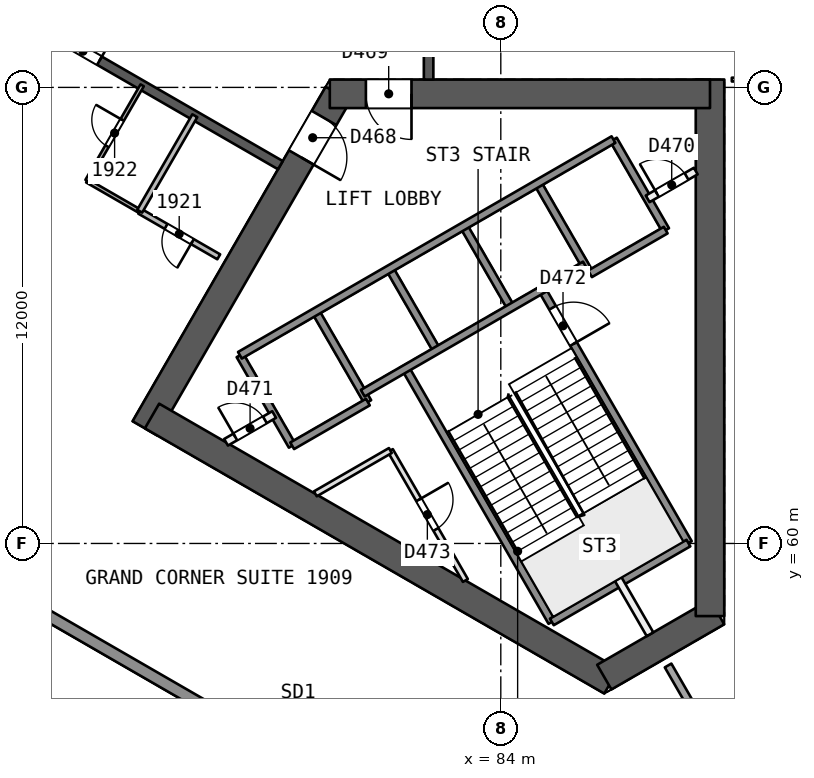
"""IFC4 building model, lengths in metres.
Left out: names, types, materials, properties, quantities, classifications, styles, units other than length and angle.
Written with IfcOpenShell. Run it as: python <this file> out.ifc"""

import sys

from ifc_helpers import new_model, si_unit, direction, frame, frame_2d, origin, place, context, subcontext, project, spatial, rectangle, extrude, element, fill, save


model = new_model("IFC4")
c1 = context("Model", 3, precision=1e-05, world=origin(), true_north=direction((0.0, 1.0)))
c2 = subcontext(c1, "Body", "Model", "MODEL_VIEW")
j1 = project(units=[si_unit("LENGTHUNIT", "METRE"), si_unit("PLANEANGLEUNIT", "RADIAN")], contexts=[c1])
p1 = place(None, origin())
s1 = spatial("IfcSite", under=j1, at=p1, CompositionType="ELEMENT")
p2 = place(p1, origin())
s2 = spatial("IfcBuilding", under=s1, at=p2, CompositionType="ELEMENT")
p3 = place(p2, frame((0.0, 0.0, 83.2)))
s3 = spatial("IfcBuildingStorey", under=s2, at=p3, CompositionType="ELEMENT", Elevation=83.2)
p4 = place(p3, frame((79.717, 71.831, 0.0), z_axis=(0.0, 0.0, 1.0), x_axis=(-0.499996230114, -0.866027580318, 0.0)))
e1 = element("IfcWall", 1, at=p4, inside=s3, PredefinedType="SHEAR", context=c2, shape_type="SweptSolid", body=[
    extrude(rectangle(XDim=10.164, YDim=0.75, at=frame_2d((5.082, 0.0))), origin(), (0.0, 0.0, 1.0), 3.7),
])
p5 = place(p4, frame((0.733, 0.0, 0.0)))
e2 = element("IfcOpeningElement", 2, at=p5, cuts=e1, PredefinedType="OPENING", context=c2, shape_type="SweptSolid", body=[
    extrude(rectangle(XDim=1.2, YDim=2.1, at=frame_2d((0.6, 1.05))), frame((0.0, 0.385, 0.0), z_axis=(0.0, -1.0, 0.0), x_axis=(1.0, 0.0, 0.0)), (0.0, 0.0, 1.0), 0.771),
])
p6 = place(p3, frame((74.822, 63.354, 0.0), z_axis=(0.0, 0.0, 1.0), x_axis=(0.8660248072, -0.500001033313, 0.0)))
e3 = element("IfcWall", 3, at=p6, inside=s3, PredefinedType="SHEAR", context=c2, shape_type="SweptSolid", body=[
    extrude(rectangle(XDim=13.958, YDim=0.75, at=frame_2d((6.979, 0.0))), origin(), (0.0, 0.0, 1.0), 3.7),
])
p7 = place(p3, frame((86.723, 56.483, 0.0), z_axis=(0.0, 0.0, 1.0), x_axis=(0.866017201164, 0.500014207086, 0.0)))
e4 = element("IfcWall", 4, at=p7, inside=s3, PredefinedType="SHEAR", context=c2, shape_type="SweptSolid", body=[
    extrude(rectangle(XDim=3.429, YDim=0.75, at=frame_2d((1.714, 0.0))), origin(), (0.0, 0.0, 1.0), 3.7),
])
p8 = place(p3, frame((89.505, 58.089, 0.0), z_axis=(0.0, 0.0, 1.0), x_axis=(0.0, 1.0, 0.0)))
e5 = element("IfcWall", 5, at=p8, inside=s3, PredefinedType="SHEAR", context=c2, shape_type="SweptSolid", body=[
    extrude(rectangle(XDim=14.117, YDim=0.75, at=frame_2d((7.059, 0.0))), origin(), (0.0, 0.0, 1.0), 3.7),
])
p9 = place(p3, frame((89.505, 71.831, 0.0), z_axis=(0.0, 0.0, 1.0), x_axis=(-1.0, 0.0, 0.0)))
e6 = element("IfcWall", 6, at=p9, inside=s3, PredefinedType="SHEAR", context=c2, shape_type="SweptSolid", body=[
    extrude(rectangle(XDim=10.005, YDim=0.75, at=frame_2d((5.002, 0.0))), origin(), (0.0, 0.0, 1.0), 3.7),
])
p10 = place(p9, frame((7.855, 0.0, 0.0)))
e7 = element("IfcOpeningElement", 7, at=p10, cuts=e6, PredefinedType="OPENING", context=c2, shape_type="SweptSolid", body=[
    extrude(rectangle(XDim=1.2, YDim=2.1, at=frame_2d((0.6, 1.05))), frame((0.0, 0.385, 0.0), z_axis=(0.0, -1.0, 0.0), x_axis=(1.0, 0.0, 0.0)), (0.0, 0.0, 1.0), 0.771),
])
p11 = place(p3, frame((82.1, 72.206, 0.0), z_axis=(0.0, 0.0, 1.0), x_axis=(0.0, 1.0, 0.0)))
e8 = element("IfcWall", 8, at=p11, inside=s3, PredefinedType="SHEAR", context=c2, shape_type="SweptSolid", body=[
    extrude(rectangle(XDim=15.588, YDim=0.25, at=frame_2d((7.794, 0.0))), origin(), (0.0, 0.0, 1.0), 3.2),
])
p12 = place(p11, frame((1.448, 0.0, 0.0)))
e9 = element("IfcOpeningElement", 9, at=p12, cuts=e8, PredefinedType="OPENING", context=c2, shape_type="SweptSolid", body=[
    extrude(rectangle(XDim=1.0, YDim=2.1, at=frame_2d((0.5, 1.05))), frame((0.0, 0.135, 0.0), z_axis=(0.0, -1.0, 0.0), x_axis=(1.0, 0.0, 0.0)), (0.0, 0.0, 1.0), 0.271),
])
p13 = place(p11, frame((6.544, 0.0, 0.0)))
e10 = element("IfcOpeningElement", 10, at=p13, cuts=e8, PredefinedType="OPENING", context=c2, shape_type="SweptSolid", body=[
    extrude(rectangle(XDim=1.0, YDim=2.1, at=frame_2d((0.5, 1.05))), frame((0.0, 0.135, 0.0), z_axis=(0.0, -1.0, 0.0), x_axis=(1.0, 0.0, 0.0)), (0.0, 0.0, 1.0), 0.271),
])
p14 = place(p11, frame((10.441, 0.0, 0.0)))
e11 = element("IfcOpeningElement", 11, at=p14, cuts=e8, PredefinedType="OPENING", context=c2, shape_type="SweptSolid", body=[
    extrude(rectangle(XDim=1.0, YDim=2.1, at=frame_2d((0.5, 1.05))), frame((0.0, 0.135, 0.0), z_axis=(0.0, -1.0, 0.0), x_axis=(1.0, 0.0, 0.0)), (0.0, 0.0, 1.0), 0.271),
])
p15 = place(p11, frame((11.841, 0.0, 0.0)))
e12 = element("IfcOpeningElement", 12, at=p15, cuts=e8, PredefinedType="OPENING", context=c2, shape_type="SweptSolid", body=[
    extrude(rectangle(XDim=1.0, YDim=2.1, at=frame_2d((0.5, 1.05))), frame((0.0, 0.135, 0.0), z_axis=(0.0, -1.0, 0.0), x_axis=(1.0, 0.0, 0.0)), (0.0, 0.0, 1.0), 0.271),
])
p16 = place(p3, frame((64.7, 77.748, 0.0), z_axis=(0.0, 0.0, 1.0), x_axis=(0.866026492143, -0.499998114903, 0.0)))
e13 = element("IfcWall", 13, at=p16, inside=s3, PredefinedType="SHEAR", context=c2, shape_type="SweptSolid", body=[
    extrude(rectangle(XDim=15.588, YDim=0.25, at=frame_2d((7.794, 0.0))), origin(), (0.0, 0.0, 1.0), 3.2),
])
p17 = place(p16, frame((3.397, 0.0, 0.0)))
e14 = element("IfcOpeningElement", 14, at=p17, cuts=e13, PredefinedType="OPENING", context=c2, shape_type="SweptSolid", body=[
    extrude(rectangle(XDim=1.0, YDim=2.1, at=frame_2d((0.5, 1.05))), frame((0.0, 0.135, 0.0), z_axis=(0.0, -1.0, 0.0), x_axis=(1.0, 0.0, 0.0)), (0.0, 0.0, 1.0), 0.271),
])
p18 = place(p16, frame((9.091, 0.0, 0.0)))
e15 = element("IfcOpeningElement", 15, at=p18, cuts=e13, PredefinedType="OPENING", context=c2, shape_type="SweptSolid", body=[
    extrude(rectangle(XDim=1.0, YDim=2.1, at=frame_2d((0.5, 1.05))), frame((0.0, 0.135, 0.0), z_axis=(0.0, -1.0, 0.0), x_axis=(1.0, 0.0, 0.0)), (0.0, 0.0, 1.0), 0.271),
])
p19 = place(p3, frame((90.079, 72.206, 0.0), z_axis=(0.0, 0.0, 1.0), x_axis=(1.0, 0.0, 0.0)))
e16 = element("IfcWall", 16, at=p19, inside=s3, PredefinedType="PARTITIONING", context=c2, shape_type="SweptSolid", body=[
    extrude(rectangle(XDim=5.198, YDim=0.1, at=frame_2d((2.599, 0.0))), origin(), (0.0, 0.0, 1.0), 3.2),
])
p20 = place(p19, frame((2.149, 0.0, 0.0)))
e17 = element("IfcOpeningElement", 17, at=p20, cuts=e16, PredefinedType="OPENING", context=c2, shape_type="SweptSolid", body=[
    extrude(rectangle(XDim=0.9, YDim=2.1, at=frame_2d((0.45, 1.05))), frame((0.0, 0.061, 0.0), z_axis=(0.0, -1.0, 0.0), x_axis=(1.0, 0.0, 0.0)), (0.0, 0.0, 1.0), 0.121),
])
p21 = place(p3, frame((88.402, 56.789, 0.0), z_axis=(0.0, 0.0, 1.0), x_axis=(0.500001128573, -0.866024752202, 0.0)))
e18 = element("IfcWall", 18, at=p21, inside=s3, PredefinedType="PARTITIONING", context=c2, shape_type="SweptSolid", body=[
    extrude(rectangle(XDim=8.696, YDim=0.2, at=frame_2d((4.348, 0.0))), origin(), (0.0, 0.0, 1.0), 3.2),
])
p22 = place(p3, frame((76.578, 67.542, 0.0), z_axis=(0.0, 0.0, 1.0), x_axis=(-0.866038271014, 0.499977712642, 0.0)))
e19 = element("IfcWall", 19, at=p22, inside=s3, PredefinedType="PARTITIONING", context=c2, shape_type="SweptSolid", body=[
    extrude(rectangle(XDim=2.401, YDim=0.15, at=frame_2d((1.2, 0.0))), origin(), (0.0, 0.0, 1.0), 3.2),
])
p23 = place(p22, frame((0.801, 0.0, 0.0)))
e20 = element("IfcOpeningElement", 20, at=p23, cuts=e19, PredefinedType="OPENING", context=c2, shape_type="SweptSolid", body=[
    extrude(rectangle(XDim=0.8, YDim=2.1, at=frame_2d((0.4, 1.05))), frame((0.0, 0.085, 0.0), z_axis=(0.0, -1.0, 0.0), x_axis=(1.0, 0.0, 0.0)), (0.0, 0.0, 1.0), 0.171),
])
p24 = place(p3, frame((74.498, 68.743, 0.0), z_axis=(0.0, 0.0, 1.0), x_axis=(-0.865989903783, 0.500061482766, 0.0)))
e21 = element("IfcWall", 21, at=p24, inside=s3, PredefinedType="PARTITIONING", context=c2, shape_type="SweptSolid", body=[
    extrude(rectangle(XDim=1.6, YDim=0.1, at=frame_2d((0.8, 0.0))), origin(), (0.0, 0.0, 1.0), 3.2),
])
p25 = place(p3, frame((73.113, 69.543, 0.0), z_axis=(0.0, 0.0, 1.0), x_axis=(0.499987231761, 0.866032775405, 0.0)))
e22 = element("IfcWall", 22, at=p25, inside=s3, PredefinedType="PARTITIONING", context=c2, shape_type="SweptSolid", body=[
    extrude(rectangle(XDim=2.9, YDim=0.1, at=frame_2d((1.45, 0.0))), origin(), (0.0, 0.0, 1.0), 3.2),
])
p26 = place(p25, frame((1.05, 0.0, 0.0)))
e23 = element("IfcOpeningElement", 23, at=p26, cuts=e22, PredefinedType="OPENING", context=c2, shape_type="SweptSolid", body=[
    extrude(rectangle(XDim=0.8, YDim=2.1, at=frame_2d((0.4, 1.05))), frame((0.0, 0.061, 0.0), z_axis=(0.0, -1.0, 0.0), x_axis=(1.0, 0.0, 0.0)), (0.0, 0.0, 1.0), 0.121),
])
p27 = place(p3, frame((75.948, 71.254, 0.0), z_axis=(0.0, 0.0, 1.0), x_axis=(-0.499987231761, -0.866032775405, 0.0)))
e24 = element("IfcWall", 24, at=p27, inside=s3, PredefinedType="PARTITIONING", context=c2, shape_type="SweptSolid", body=[
    extrude(rectangle(XDim=2.9, YDim=0.15, at=frame_2d((1.45, 0.0))), origin(), (0.0, 0.0, 1.0), 3.2),
])
p28 = place(p3, frame((90.221, 47.626, 0.0), z_axis=(0.0, 0.0, 1.0), x_axis=(-0.866025832118, 0.499999258104, 0.0)))
e25 = element("IfcWall", 25, at=p28, inside=s3, PredefinedType="SOLIDWALL", context=c2, shape_type="SweptSolid", body=[
    extrude(rectangle(XDim=58.737, YDim=0.3, at=frame_2d((29.368, 0.0))), origin(), (0.0, 0.0, 1.0), 3.2),
])
p29 = place(p28, frame((32.065, 0.0, 0.0)))
e26 = element("IfcOpeningElement", 26, at=p29, cuts=e25, PredefinedType="OPENING", context=c2, shape_type="SweptSolid", body=[
    extrude(rectangle(XDim=2.4, YDim=2.4, at=frame_2d((1.2, 1.2))), frame((0.0, 0.161, 0.0), z_axis=(0.0, -1.0, 0.0), x_axis=(1.0, 0.0, 0.0)), (0.0, 0.0, 1.0), 0.321),
])
p30 = place(p28, frame((45.575, 0.0, 0.0)))
e27 = element("IfcOpeningElement", 27, at=p30, cuts=e25, PredefinedType="OPENING", context=c2, shape_type="SweptSolid", body=[
    extrude(rectangle(XDim=2.4, YDim=2.4, at=frame_2d((1.2, 1.2))), frame((0.0, 0.161, 0.0), z_axis=(0.0, -1.0, 0.0), x_axis=(1.0, 0.0, 0.0)), (0.0, 0.0, 1.0), 0.321),
])
p31 = place(p28, frame((13.441, 0.0, 0.0)))
e28 = element("IfcOpeningElement", 28, at=p31, cuts=e25, PredefinedType="OPENING", context=c2, shape_type="SweptSolid", body=[
    extrude(rectangle(XDim=2.4, YDim=2.4, at=frame_2d((1.2, 1.2))), frame((0.0, 0.161, 0.0), z_axis=(0.0, -1.0, 0.0), x_axis=(1.0, 0.0, 0.0)), (0.0, 0.0, 1.0), 0.321),
])
p32 = place(p3, frame((77.135, 64.952, 0.0), z_axis=(0.0, 0.0, 1.0), x_axis=(0.499996545922, -0.866027397988, 0.0)))
e29 = element("IfcWall", 29, at=p32, inside=s3, PredefinedType="SOLIDWALL", context=c2, shape_type="SweptSolid", body=[
    extrude(rectangle(XDim=2.75, YDim=0.2, at=frame_2d((1.375, 0.0))), origin(), (0.0, 0.0, 1.0), 3.2),
])
p33 = place(p3, frame((81.094, 62.445, 0.0), z_axis=(0.0, 0.0, 1.0), x_axis=(0.499990112884, -0.866031112038, 0.0)))
e30 = element("IfcWall", 30, at=p33, inside=s3, PredefinedType="PARTITIONING", context=c2, shape_type="SweptSolid", body=[
    extrude(rectangle(XDim=3.948, YDim=0.15, at=frame_2d((1.974, 0.0))), origin(), (0.0, 0.0, 1.0), 3.2),
])
p34 = place(p33, frame((1.496, 0.0, 0.0)))
e31 = element("IfcOpeningElement", 31, at=p34, cuts=e30, PredefinedType="OPENING", context=c2, shape_type="SweptSolid", body=[
    extrude(rectangle(XDim=0.9, YDim=2.1, at=frame_2d((0.45, 1.05))), frame((0.0, 0.085, 0.0), z_axis=(0.0, -1.0, 0.0), x_axis=(1.0, 0.0, 0.0)), (0.0, 0.0, 1.0), 0.171),
])
p35 = place(p3, frame((79.127, 66.102, 0.0), z_axis=(0.0, 0.0, 1.0), x_axis=(0.499996545922, -0.866027397988, 0.0)))
e32 = element("IfcWall", 32, at=p35, inside=s3, PredefinedType="SOLIDWALL", context=c2, shape_type="SweptSolid", body=[
    extrude(rectangle(XDim=2.75, YDim=0.2, at=frame_2d((1.375, 0.0))), origin(), (0.0, 0.0, 1.0), 3.2),
])
p36 = place(p3, frame((81.493, 64.604, 0.0), z_axis=(0.0, 0.0, 1.0), x_axis=(0.500006057782, -0.866021906294, 0.0)))
e33 = element("IfcWall", 33, at=p36, inside=s3, PredefinedType="SOLIDWALL", context=c2, shape_type="SweptSolid", body=[
    extrude(rectangle(XDim=7.7, YDim=0.2, at=frame_2d((3.85, 0.0))), origin(), (0.0, 0.0, 1.0), 3.2),
])
p37 = place(p3, frame((81.076, 67.227, 0.0), z_axis=(0.0, 0.0, 1.0), x_axis=(0.50000366821, -0.866023285932, 0.0)))
e34 = element("IfcWall", 34, at=p37, inside=s3, PredefinedType="SOLIDWALL", context=c2, shape_type="SweptSolid", body=[
    extrude(rectangle(XDim=2.48, YDim=0.2, at=frame_2d((1.24, 0.0))), origin(), (0.0, 0.0, 1.0), 3.2),
])
p38 = place(p3, frame((87.09, 59.06, 0.0), z_axis=(0.0, 0.0, 1.0), x_axis=(0.499937194881, -0.866061661301, 0.0)))
e35 = element("IfcWall", 35, at=p38, inside=s3, PredefinedType="PARTITIONING", context=c2, shape_type="SweptSolid", body=[
    extrude(rectangle(XDim=1.673, YDim=0.2, at=frame_2d((0.836, 0.0))), origin(), (0.0, 0.0, 1.0), 3.2),
])
p39 = place(p3, frame((83.024, 68.352, 0.0), z_axis=(0.0, 0.0, 1.0), x_axis=(0.50000366821, -0.866023285932, 0.0)))
e36 = element("IfcWall", 36, at=p39, inside=s3, PredefinedType="SOLIDWALL", context=c2, shape_type="SweptSolid", body=[
    extrude(rectangle(XDim=2.48, YDim=0.2, at=frame_2d((1.24, 0.0))), origin(), (0.0, 0.0, 1.0), 3.2),
])
p40 = place(p3, frame((85.087, 66.679, 0.0), z_axis=(0.0, 0.0, 1.0), x_axis=(0.500019787375, -0.866013979237, 0.0)))
e37 = element("IfcWall", 37, at=p40, inside=s3, PredefinedType="SOLIDWALL", context=c2, shape_type="SweptSolid", body=[
    extrude(rectangle(XDim=7.7, YDim=0.2, at=frame_2d((3.85, 0.0))), origin(), (0.0, 0.0, 1.0), 3.2),
])
p41 = place(p40, frame((0.55, 0.0, 0.0)))
e38 = element("IfcOpeningElement", 38, at=p41, cuts=e37, PredefinedType="OPENING", context=c2, shape_type="SweptSolid", body=[
    extrude(rectangle(XDim=1.1, YDim=2.1, at=frame_2d((0.55, 1.05))), frame((0.0, 0.11, 0.0), z_axis=(0.0, -1.0, 0.0), x_axis=(1.0, 0.0, 0.0)), (0.0, 0.0, 1.0), 0.221),
])
for number, where, z_axis, x_axis in (
    (39, (84.973, 69.477, 0.0), (0.0, 0.0, 1.0), (0.5, -0.866, 0.0)),
    (40, (86.965, 70.626, 0.0), (0.0, 0.0, 1.0), (0.5, -0.866, 0.0)),
):
    element("IfcWall", number, at=place(p3, frame(where, z_axis=z_axis, x_axis=x_axis)), inside=s3, PredefinedType="SOLIDWALL", context=c2, shape_type="SweptSolid", body=[
        extrude(rectangle(XDim=2.75, YDim=0.2, at=frame_2d((1.375, 0.0))), origin(), (0.0, 0.0, 1.0), 3.2),
    ])
p42 = place(p3, frame((77.135, 64.952, 0.0), z_axis=(0.0, 0.0, 1.0), x_axis=(0.866031916153, 0.499988720078, 0.0)))
e41 = element("IfcWall", 41, at=p42, inside=s3, PredefinedType="SOLIDWALL", context=c2, shape_type="SweptSolid", body=[
    extrude(rectangle(XDim=11.35, YDim=0.2, at=frame_2d((5.675, 0.0))), origin(), (0.0, 0.0, 1.0), 3.2),
])
p43 = place(p3, frame((76.77, 62.662, 0.0), z_axis=(0.0, 0.0, 1.0), x_axis=(0.866054810376, 0.49994906283, 0.0)))
e42 = element("IfcWall", 42, at=p43, inside=s3, PredefinedType="PARTITIONING", context=c2, shape_type="SweptSolid", body=[
    extrude(rectangle(XDim=1.461, YDim=0.2, at=frame_2d((0.73, 0.0))), origin(), (0.0, 0.0, 1.0), 3.2),
])
p44 = place(p43, frame((0.281, 0.0, 0.0)))
e43 = element("IfcOpeningElement", 43, at=p44, cuts=e42, PredefinedType="OPENING", context=c2, shape_type="SweptSolid", body=[
    extrude(rectangle(XDim=0.9, YDim=2.1, at=frame_2d((0.45, 1.05))), frame((0.0, 0.11, 0.0), z_axis=(0.0, -1.0, 0.0), x_axis=(1.0, 0.0, 0.0)), (0.0, 0.0, 1.0), 0.221),
])
p45 = place(p3, frame((87.865, 69.068, 0.0), z_axis=(0.0, 0.0, 1.0), x_axis=(0.865982457891, 0.500074377092, 0.0)))
e44 = element("IfcWall", 44, at=p45, inside=s3, PredefinedType="PARTITIONING", context=c2, shape_type="SweptSolid", body=[
    extrude(rectangle(XDim=1.461, YDim=0.2, at=frame_2d((0.73, 0.0))), origin(), (0.0, 0.0, 1.0), 3.2),
])
p46 = place(p45, frame((0.281, 0.0, 0.0)))
e45 = element("IfcOpeningElement", 45, at=p46, cuts=e44, PredefinedType="OPENING", context=c2, shape_type="SweptSolid", body=[
    extrude(rectangle(XDim=0.9, YDim=2.1, at=frame_2d((0.45, 1.05))), frame((0.0, 0.11, 0.0), z_axis=(0.0, -1.0, 0.0), x_axis=(1.0, 0.0, 0.0)), (0.0, 0.0, 1.0), 0.221),
])
p47 = place(p3, frame((80.367, 63.954, 0.0), z_axis=(0.0, 0.0, 1.0), x_axis=(0.866026575979, 0.499997969693, 0.0)))
e46 = element("IfcWall", 46, at=p47, inside=s3, PredefinedType="SOLIDWALL", context=c2, shape_type="SweptSolid", body=[
    extrude(rectangle(XDim=6.75, YDim=0.2, at=frame_2d((3.375, 0.0))), origin(), (0.0, 0.0, 1.0), 3.2),
])
p48 = place(p3, frame((78.51, 62.57, 0.0), z_axis=(0.0, 0.0, 1.0), x_axis=(0.866053019151, 0.499952165731, 0.0)))
e47 = element("IfcWall", 47, at=p48, inside=s3, PredefinedType="SOLIDWALL", context=c2, shape_type="SweptSolid", body=[
    extrude(rectangle(XDim=2.3, YDim=0.2, at=frame_2d((1.15, 0.0))), origin(), (0.0, 0.0, 1.0), 3.2),
])
p49 = place(p3, frame((86.348, 67.095, 0.0), z_axis=(0.0, 0.0, 1.0), x_axis=(0.86602648383, 0.499998129301, 0.0)))
e48 = element("IfcWall", 48, at=p49, inside=s3, PredefinedType="SOLIDWALL", context=c2, shape_type="SweptSolid", body=[
    extrude(rectangle(XDim=2.3, YDim=0.2, at=frame_2d((1.15, 0.0))), origin(), (0.0, 0.0, 1.0), 3.2),
])
p50 = place(p3, frame((79.12, 61.305, 0.0), z_axis=(0.0, 0.0, 1.0), x_axis=(0.866046471269, 0.499963508271, 0.0)))
e49 = element("IfcWall", 49, at=p50, inside=s3, PredefinedType="PARTITIONING", context=c2, shape_type="SweptSolid", body=[
    extrude(rectangle(XDim=2.28, YDim=0.15, at=frame_2d((1.14, 0.0))), origin(), (0.0, 0.0, 1.0), 3.2),
])
p51 = place(p3, frame((85.343, 57.935, 0.0), z_axis=(0.0, 0.0, 1.0), x_axis=(0.866004344652, 0.500036473714, 0.0)))
e50 = element("IfcWall", 50, at=p51, inside=s3, PredefinedType="SOLIDWALL", context=c2, shape_type="SweptSolid", body=[
    extrude(rectangle(XDim=4.15, YDim=0.2, at=frame_2d((2.075, 0.0))), origin(), (0.0, 0.0, 1.0), 3.2),
])
p52 = place(p23, origin())
e51 = element("IfcDoor", 51, at=p52, inside=s3, OperationType="SINGLE_SWING_LEFT", PredefinedType="NOTDEFINED", context=c2, shape_type="SweptSolid", body=[
    extrude(rectangle(XDim=0.8, YDim=2.1, at=frame_2d((0.4, 1.05))), frame((0.0, 0.025, 0.0), z_axis=(0.0, -1.0, 0.0), x_axis=(1.0, 0.0, 0.0)), (0.0, 0.0, 1.0), 0.05),
])
fill(e20, e51)
p53 = place(p26, origin())
e52 = element("IfcDoor", 52, at=p53, inside=s3, OperationType="SINGLE_SWING_RIGHT", PredefinedType="NOTDEFINED", context=c2, shape_type="SweptSolid", body=[
    extrude(rectangle(XDim=0.8, YDim=2.1, at=frame_2d((0.4, 1.05))), frame((0.0, 0.025, 0.0), z_axis=(0.0, -1.0, 0.0), x_axis=(1.0, 0.0, 0.0)), (0.0, 0.0, 1.0), 0.05),
])
fill(e23, e52)
p54 = place(p18, origin())
e53 = element("IfcDoor", 53, at=p54, inside=s3, OperationType="SINGLE_SWING_RIGHT", PredefinedType="NOTDEFINED", context=c2, shape_type="SweptSolid", body=[
    extrude(rectangle(XDim=1.0, YDim=2.1, at=frame_2d((0.5, 1.05))), frame((0.0, 0.025, 0.0), z_axis=(0.0, -1.0, 0.0), x_axis=(1.0, 0.0, 0.0)), (0.0, 0.0, 1.0), 0.05),
])
fill(e15, e53)
p55 = place(p5, origin())
e54 = element("IfcDoor", 54, at=p55, inside=s3, OperationType="SINGLE_SWING_RIGHT", PredefinedType="NOTDEFINED", context=c2, shape_type="SweptSolid", body=[
    extrude(rectangle(XDim=1.2, YDim=2.1, at=frame_2d((0.6, 1.05))), frame((0.0, 0.025, 0.0), z_axis=(0.0, -1.0, 0.0), x_axis=(1.0, 0.0, 0.0)), (0.0, 0.0, 1.0), 0.05),
])
fill(e2, e54)
p56 = place(p10, origin())
e55 = element("IfcDoor", 55, at=p56, inside=s3, OperationType="SINGLE_SWING_LEFT", PredefinedType="NOTDEFINED", context=c2, shape_type="SweptSolid", body=[
    extrude(rectangle(XDim=1.2, YDim=2.1, at=frame_2d((0.6, 1.05))), frame((0.0, 0.025, 0.0), z_axis=(0.0, -1.0, 0.0), x_axis=(1.0, 0.0, 0.0)), (0.0, 0.0, 1.0), 0.05),
])
fill(e7, e55)
p57 = place(p46, origin())
e56 = element("IfcDoor", 56, at=p57, inside=s3, OperationType="SINGLE_SWING_LEFT", PredefinedType="NOTDEFINED", context=c2, shape_type="SweptSolid", body=[
    extrude(rectangle(XDim=0.9, YDim=2.1, at=frame_2d((0.45, 1.05))), frame((0.0, 0.025, 0.0), z_axis=(0.0, -1.0, 0.0), x_axis=(1.0, 0.0, 0.0)), (0.0, 0.0, 1.0), 0.05),
])
fill(e45, e56)
p58 = place(p44, origin())
e57 = element("IfcDoor", 57, at=p58, inside=s3, OperationType="SINGLE_SWING_LEFT", PredefinedType="NOTDEFINED", context=c2, shape_type="SweptSolid", body=[
    extrude(rectangle(XDim=0.9, YDim=2.1, at=frame_2d((0.45, 1.05))), frame((0.0, 0.025, 0.0), z_axis=(0.0, -1.0, 0.0), x_axis=(1.0, 0.0, 0.0)), (0.0, 0.0, 1.0), 0.05),
])
fill(e43, e57)
p59 = place(p41, origin())
e58 = element("IfcDoor", 58, at=p59, inside=s3, OperationType="SINGLE_SWING_RIGHT", PredefinedType="NOTDEFINED", context=c2, shape_type="SweptSolid", body=[
    extrude(rectangle(XDim=1.1, YDim=2.1, at=frame_2d((0.55, 1.05))), frame((0.0, 0.025, 0.0), z_axis=(0.0, -1.0, 0.0), x_axis=(1.0, 0.0, 0.0)), (0.0, 0.0, 1.0), 0.05),
])
fill(e38, e58)
p60 = place(p34, origin())
e59 = element("IfcDoor", 59, at=p60, inside=s3, OperationType="SINGLE_SWING_LEFT", PredefinedType="NOTDEFINED", context=c2, shape_type="SweptSolid", body=[
    extrude(rectangle(XDim=0.9, YDim=2.1, at=frame_2d((0.45, 1.05))), frame((0.0, 0.025, 0.0), z_axis=(0.0, -1.0, 0.0), x_axis=(1.0, 0.0, 0.0)), (0.0, 0.0, 1.0), 0.05),
])
fill(e31, e59)
save(model, sys.argv[1])
